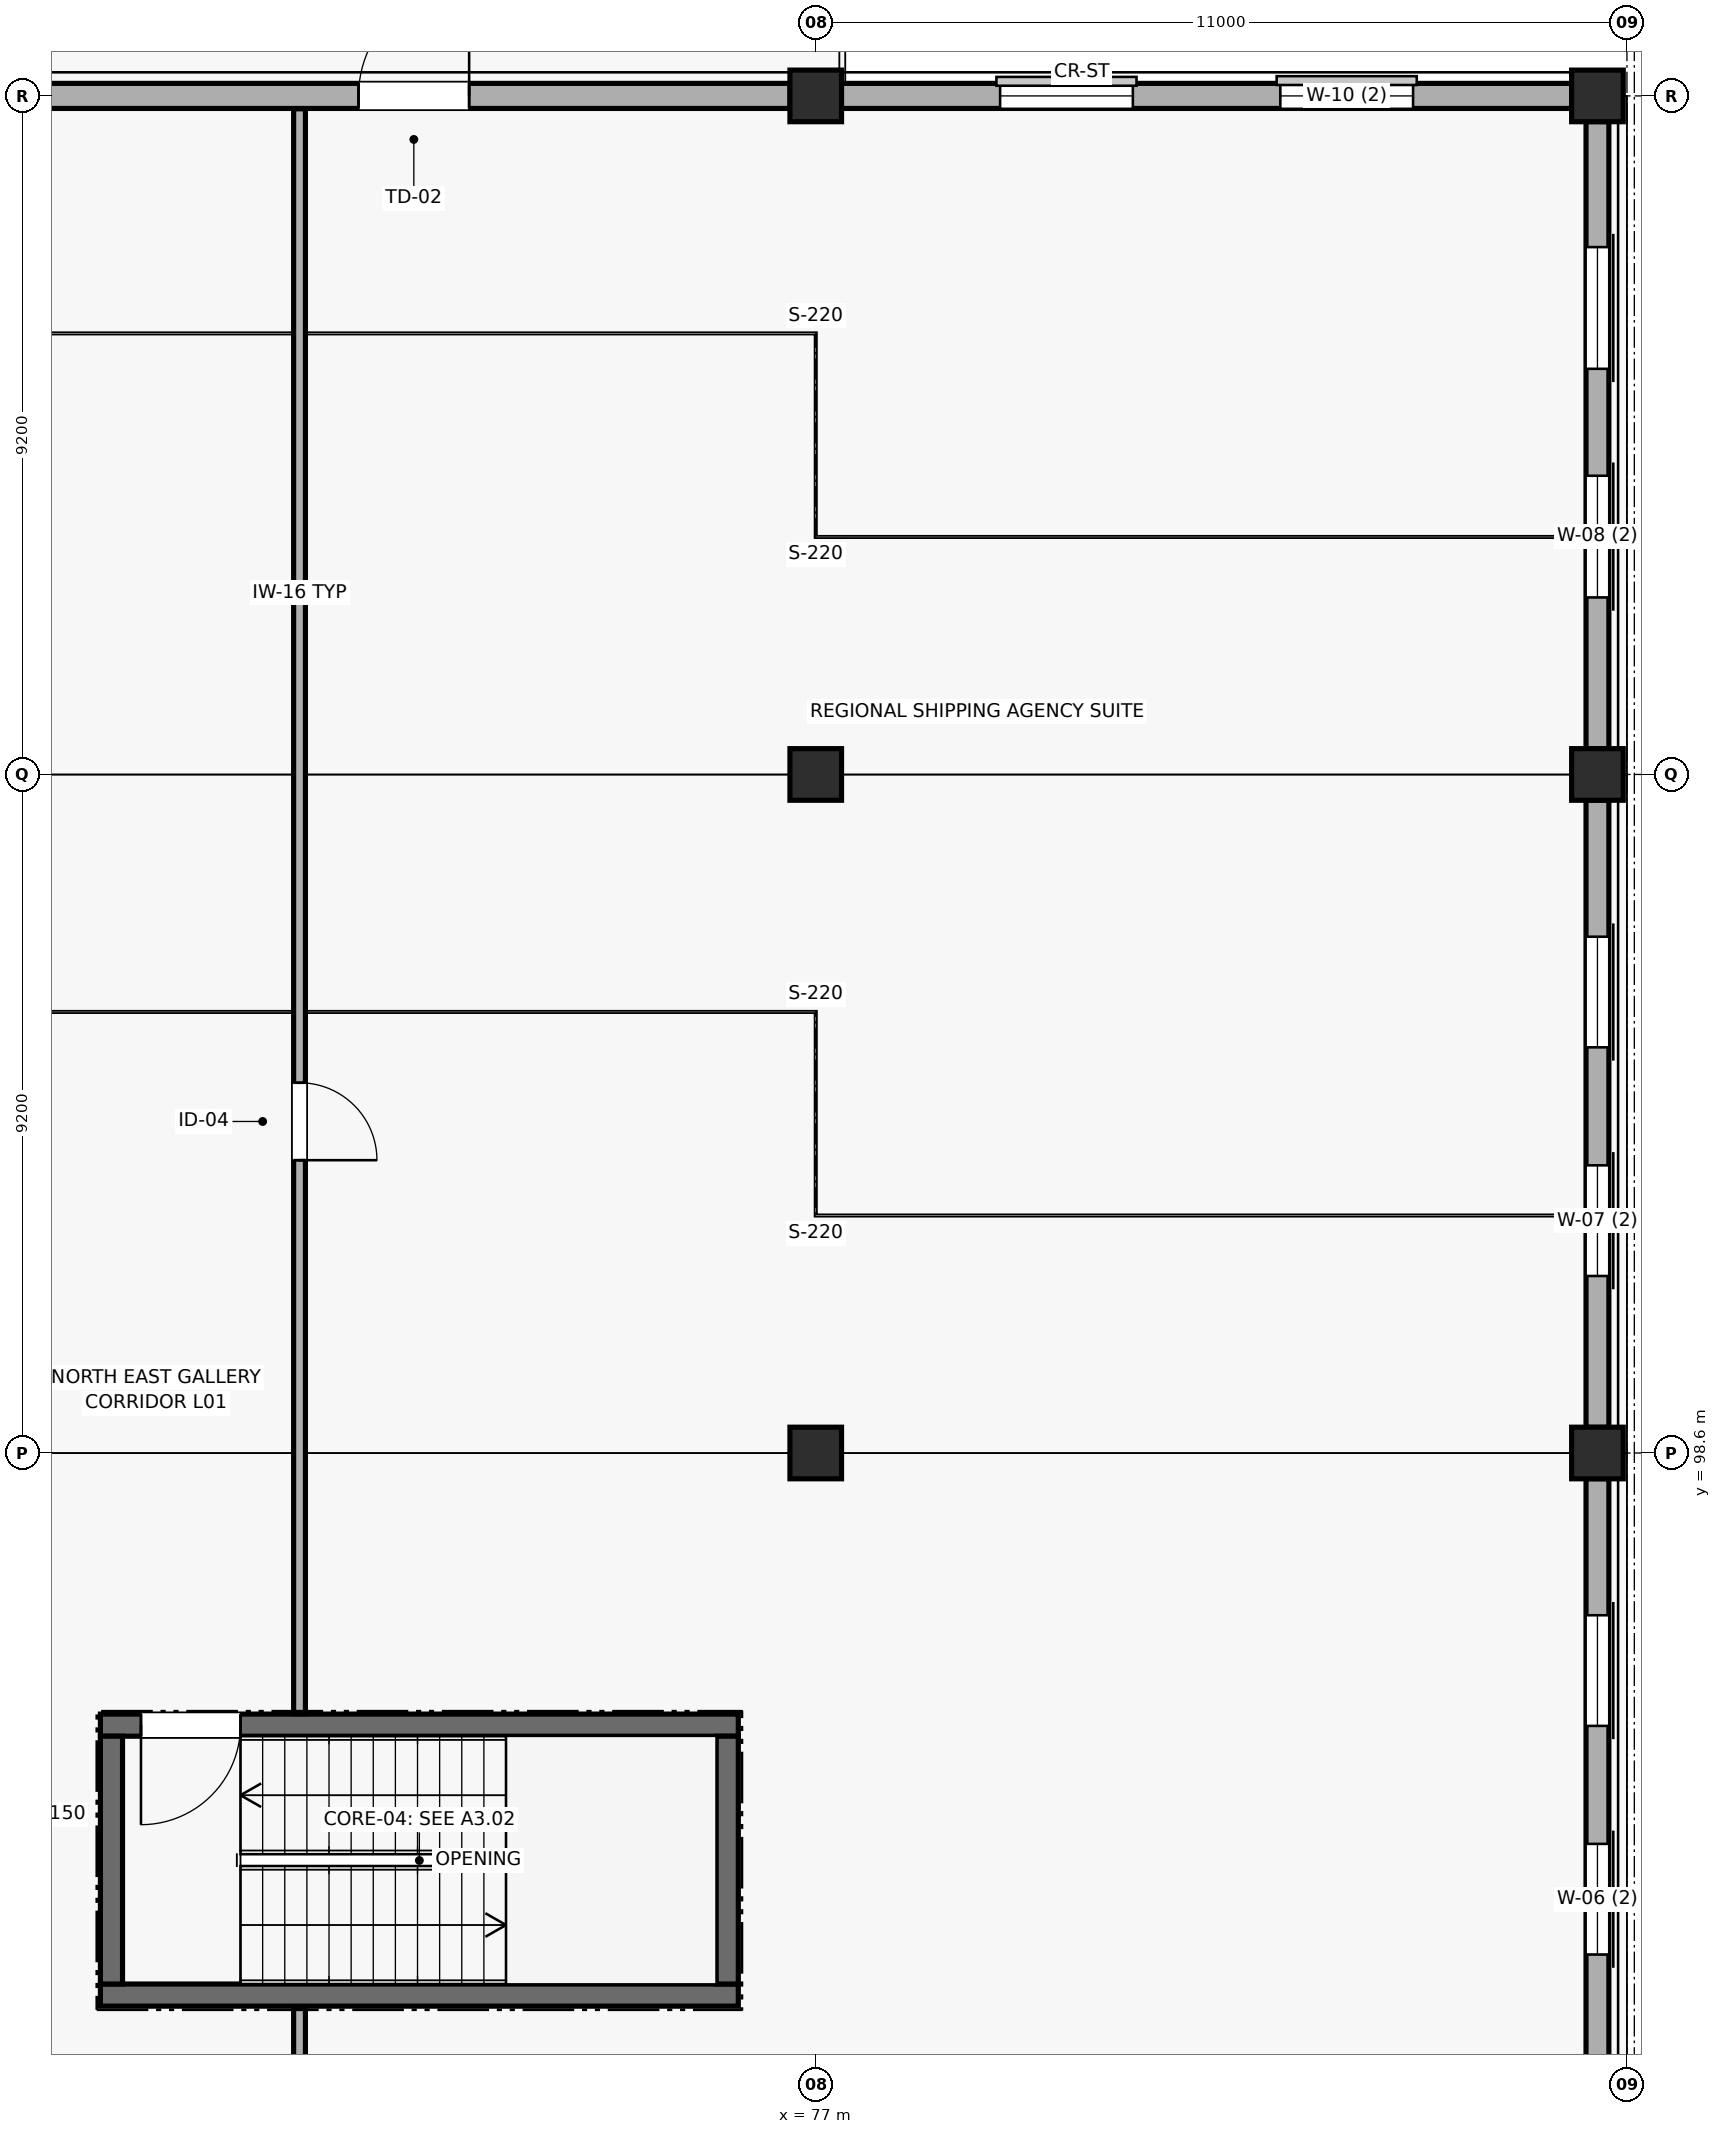
"""IFC4 building model, lengths in metres.
Left out: names, types, materials, properties, quantities, classifications, styles, units other than length and angle.
Written with IfcOpenShell. Run it as: python <this file> out.ifc"""

import sys

from ifc_helpers import new_model, si_unit, direction, frame, frame_2d, origin, origin_2d, place, context, subcontext, project, spatial, rectangle, extrude, element, fill, save


model = new_model("IFC4")
c1 = context("Model", 3, precision=1e-05, world=origin(), true_north=direction((0.0, 1.0)))
c2 = subcontext(c1, "Body", "Model", "MODEL_VIEW")
j1 = project(units=[si_unit("LENGTHUNIT", "METRE"), si_unit("PLANEANGLEUNIT", "RADIAN")], contexts=[c1])
p1 = place(None, origin())
s1 = spatial("IfcSite", under=j1, at=p1, CompositionType="ELEMENT")
p2 = place(p1, origin())
s2 = spatial("IfcBuilding", under=s1, at=p2, CompositionType="ELEMENT")
p3 = place(p2, frame((0.0, 0.0, 5.4)))
s3 = spatial("IfcBuildingStorey", under=s2, at=p3, CompositionType="ELEMENT", Elevation=5.4)
for number, where, z_axis, x_axis in (
    (1, (77.0, 98.6, 0.0), (0.0, 0.0, 1.0), (1.0, 0.0, 0.0)),
    (2, (77.0, 107.8, 0.0), (0.0, 0.0, 1.0), (1.0, 0.0, 0.0)),
    (3, (77.0, 117.0, 0.0), (0.0, 0.0, 1.0), (1.0, 0.0, 0.0)),
    (4, (87.6, 98.6, 0.0), (0.0, 0.0, 1.0), (1.0, 0.0, 0.0)),
    (5, (87.6, 107.8, 0.0), (0.0, 0.0, 1.0), (1.0, 0.0, 0.0)),
    (6, (87.6, 117.0, 0.0), (0.0, 0.0, 1.0), (1.0, 0.0, 0.0)),
):
    element("IfcColumn", number, at=place(p3, frame(where, z_axis=z_axis, x_axis=x_axis)), inside=s3, PredefinedType="COLUMN", context=c2, shape_type="SweptSolid", body=[
        extrude(rectangle(XDim=0.7, YDim=0.7, at=origin_2d()), origin(), (0.0, 0.0, 1.0), 4.5),
    ])
p4 = place(p3, frame((76.652, 117.0, 0.0), z_axis=(0.0, 0.0, 1.0), x_axis=(-1.0, 0.0, 0.0)))
e7 = element("IfcWall", 7, at=p4, inside=s3, PredefinedType="SOLIDWALL", context=c2, shape_type="SweptSolid", body=[
    extrude(rectangle(XDim=10.304, YDim=0.34, at=frame_2d((5.152, 0.0))), origin(), (0.0, 0.0, 1.0), 3.625),
])
p5 = place(p4, frame((4.352, 0.0, 0.0)))
e8 = element("IfcOpeningElement", 8, at=p5, cuts=e7, PredefinedType="OPENING", context=c2, shape_type="SweptSolid", body=[
    extrude(rectangle(XDim=1.5, YDim=2.25, at=frame_2d((0.75, 1.125))), frame((0.0, 0.18, 0.0), z_axis=(0.0, -1.0, 0.0), x_axis=(1.0, 0.0, 0.0)), (0.0, 0.0, 1.0), 0.36),
])
p6 = place(p3, frame((87.252, 117.0, 0.0), z_axis=(0.0, 0.0, 1.0), x_axis=(-1.0, 0.0, 0.0)))
e9 = element("IfcWall", 9, at=p6, inside=s3, PredefinedType="SOLIDWALL", context=c2, shape_type="SweptSolid", body=[
    extrude(rectangle(XDim=9.904, YDim=0.34, at=frame_2d((4.952, 0.0))), origin(), (0.0, 0.0, 1.0), 3.635),
])
p7 = place(p6, frame((2.152, 0.0, 0.95)))
e10 = element("IfcOpeningElement", 10, at=p7, cuts=e9, PredefinedType="OPENING", context=c2, shape_type="SweptSolid", body=[
    extrude(rectangle(XDim=1.8, YDim=2.4, at=frame_2d((0.9, 1.2))), frame((0.0, 0.18, 0.0), z_axis=(0.0, -1.0, 0.0), x_axis=(1.0, 0.0, 0.0)), (0.0, 0.0, 1.0), 0.36),
])
p8 = place(p6, frame((5.952, 0.0, 0.95)))
e11 = element("IfcOpeningElement", 11, at=p8, cuts=e9, PredefinedType="OPENING", context=c2, shape_type="SweptSolid", body=[
    extrude(rectangle(XDim=1.8, YDim=2.4, at=frame_2d((0.9, 1.2))), frame((0.0, 0.18, 0.0), z_axis=(0.0, -1.0, 0.0), x_axis=(1.0, 0.0, 0.0)), (0.0, 0.0, 1.0), 0.36),
])
p9 = place(p3, frame((87.6, 89.748, 0.0), z_axis=(0.0, 0.0, 1.0), x_axis=(0.0, 1.0, 0.0)))
e12 = element("IfcWall", 12, at=p9, inside=s3, PredefinedType="SOLIDWALL", context=c2, shape_type="SweptSolid", body=[
    extrude(rectangle(XDim=8.504, YDim=0.31, at=frame_2d((4.252, 0.0))), origin(), (0.0, 0.0, 1.0), 3.735),
])
p10 = place(p9, frame((2.052, 0.0, 0.95)))
e13 = element("IfcOpeningElement", 13, at=p10, cuts=e12, PredefinedType="OPENING", context=c2, shape_type="SweptSolid", body=[
    extrude(rectangle(XDim=1.5, YDim=1.8, at=frame_2d((0.75, 0.9))), frame((0.0, 0.165, 0.0), z_axis=(0.0, -1.0, 0.0), x_axis=(1.0, 0.0, 0.0)), (0.0, 0.0, 1.0), 0.33),
])
p11 = place(p9, frame((5.152, 0.0, 0.95)))
e14 = element("IfcOpeningElement", 14, at=p11, cuts=e12, PredefinedType="OPENING", context=c2, shape_type="SweptSolid", body=[
    extrude(rectangle(XDim=1.5, YDim=1.8, at=frame_2d((0.75, 0.9))), frame((0.0, 0.165, 0.0), z_axis=(0.0, -1.0, 0.0), x_axis=(1.0, 0.0, 0.0)), (0.0, 0.0, 1.0), 0.33),
])
p12 = place(p3, frame((87.6, 98.948, 0.0), z_axis=(0.0, 0.0, 1.0), x_axis=(0.0, 1.0, 0.0)))
e15 = element("IfcWall", 15, at=p12, inside=s3, PredefinedType="SOLIDWALL", context=c2, shape_type="SweptSolid", body=[
    extrude(rectangle(XDim=8.504, YDim=0.31, at=frame_2d((4.252, 0.0))), origin(), (0.0, 0.0, 1.0), 3.735),
])
p13 = place(p12, frame((2.052, 0.0, 0.95)))
e16 = element("IfcOpeningElement", 16, at=p13, cuts=e15, PredefinedType="OPENING", context=c2, shape_type="SweptSolid", body=[
    extrude(rectangle(XDim=1.5, YDim=2.25, at=frame_2d((0.75, 1.125))), frame((0.0, 0.165, 0.0), z_axis=(0.0, -1.0, 0.0), x_axis=(1.0, 0.0, 0.0)), (0.0, 0.0, 1.0), 0.33),
])
p14 = place(p12, frame((5.152, 0.0, 0.95)))
e17 = element("IfcOpeningElement", 17, at=p14, cuts=e15, PredefinedType="OPENING", context=c2, shape_type="SweptSolid", body=[
    extrude(rectangle(XDim=1.5, YDim=2.25, at=frame_2d((0.75, 1.125))), frame((0.0, 0.165, 0.0), z_axis=(0.0, -1.0, 0.0), x_axis=(1.0, 0.0, 0.0)), (0.0, 0.0, 1.0), 0.33),
])
p15 = place(p3, frame((87.6, 108.148, 0.0), z_axis=(0.0, 0.0, 1.0), x_axis=(0.0, 1.0, 0.0)))
e18 = element("IfcWall", 18, at=p15, inside=s3, PredefinedType="SOLIDWALL", context=c2, shape_type="SweptSolid", body=[
    extrude(rectangle(XDim=8.504, YDim=0.31, at=frame_2d((4.252, 0.0))), origin(), (0.0, 0.0, 1.0), 3.735),
])
p16 = place(p15, frame((2.052, 0.0, 0.95)))
e19 = element("IfcOpeningElement", 19, at=p16, cuts=e18, PredefinedType="OPENING", context=c2, shape_type="SweptSolid", body=[
    extrude(rectangle(XDim=1.65, YDim=2.25, at=frame_2d((0.825, 1.125))), frame((0.0, 0.165, 0.0), z_axis=(0.0, -1.0, 0.0), x_axis=(1.0, 0.0, 0.0)), (0.0, 0.0, 1.0), 0.33),
])
p17 = place(p15, frame((5.152, 0.0, 0.95)))
e20 = element("IfcOpeningElement", 20, at=p17, cuts=e18, PredefinedType="OPENING", context=c2, shape_type="SweptSolid", body=[
    extrude(rectangle(XDim=1.65, YDim=2.25, at=frame_2d((0.825, 1.125))), frame((0.0, 0.165, 0.0), z_axis=(0.0, -1.0, 0.0), x_axis=(1.0, 0.0, 0.0)), (0.0, 0.0, 1.0), 0.33),
])
p18 = place(p3, frame((67.3, 91.25, 0.0), z_axis=(0.0, 0.0, 1.0), x_axis=(1.0, 0.0, 0.0)))
e21 = element("IfcWall", 21, at=p18, inside=s3, PredefinedType="SHEAR", context=c2, shape_type="SweptSolid", body=[
    extrude(rectangle(XDim=8.65, YDim=0.3, at=frame_2d((4.325, 0.0))), origin(), (0.0, 0.0, 1.0), 4.28),
])
p19 = place(p3, frame((75.95, 94.91, 0.0), z_axis=(0.0, 0.0, 1.0), x_axis=(-1.0, 0.0, 0.0)))
e22 = element("IfcWall", 22, at=p19, inside=s3, PredefinedType="SHEAR", context=c2, shape_type="SweptSolid", body=[
    extrude(rectangle(XDim=8.65, YDim=0.3, at=frame_2d((4.325, 0.0))), origin(), (0.0, 0.0, 1.0), 4.28),
])
p20 = place(p19, frame((6.75, 0.0, 0.0)))
e23 = element("IfcOpeningElement", 23, at=p20, cuts=e22, PredefinedType="OPENING", context=c2, shape_type="SweptSolid", body=[
    extrude(rectangle(XDim=1.35, YDim=2.2, at=frame_2d((0.675, 1.1))), frame((0.0, 0.16, 0.0), z_axis=(0.0, -1.0, 0.0), x_axis=(1.0, 0.0, 0.0)), (0.0, 0.0, 1.0), 0.32),
])
for number, where, z_axis, x_axis in (
    (24, (67.45, 94.76, 0.0), (0.0, 0.0, 1.0), (0.0, -1.0, 0.0)),
    (25, (75.8, 91.4, 0.0), (0.0, 0.0, 1.0), (0.0, 1.0, 0.0)),
):
    element("IfcWall", number, at=place(p3, frame(where, z_axis=z_axis, x_axis=x_axis)), inside=s3, PredefinedType="SHEAR", context=c2, shape_type="SweptSolid", body=[
        extrude(rectangle(XDim=3.36, YDim=0.3, at=frame_2d((1.68, 0.0))), origin(), (0.0, 0.0, 1.0), 4.28),
    ])
p21 = place(p3, frame((70.0, 95.065, 0.0), z_axis=(0.0, 0.0, 1.0), x_axis=(0.0, 1.0, 0.0)))
e26 = element("IfcWall", 26, at=p21, inside=s3, PredefinedType="PARTITIONING", context=c2, shape_type="SweptSolid", body=[
    extrude(rectangle(XDim=21.76, YDim=0.16, at=frame_2d((10.88, 0.0))), origin(), (0.0, 0.0, 1.0), 3.625),
])
p22 = place(p21, frame((7.505, 0.0, 0.0)))
e27 = element("IfcOpeningElement", 27, at=p22, cuts=e26, PredefinedType="OPENING", context=c2, shape_type="SweptSolid", body=[
    extrude(rectangle(XDim=1.05, YDim=2.2, at=frame_2d((0.525, 1.1))), frame((0.0, 0.09, 0.0), z_axis=(0.0, -1.0, 0.0), x_axis=(1.0, 0.0, 0.0)), (0.0, 0.0, 1.0), 0.18),
])
p23 = place(p3, frame((70.0, 71.76, 0.0), z_axis=(0.0, 0.0, 1.0), x_axis=(0.0, 1.0, 0.0)))
e28 = element("IfcWall", 28, at=p23, inside=s3, PredefinedType="PARTITIONING", context=c2, shape_type="SweptSolid", body=[
    extrude(rectangle(XDim=19.335, YDim=0.16, at=frame_2d((9.667, 0.0))), origin(), (0.0, 0.0, 1.0), 3.625),
])
p24 = place(p23, frame((7.54, 0.0, 0.0)))
e29 = element("IfcOpeningElement", 29, at=p24, cuts=e28, PredefinedType="OPENING", context=c2, shape_type="SweptSolid", body=[
    extrude(rectangle(XDim=1.7, YDim=2.35, at=frame_2d((0.85, 1.175))), frame((0.0, 0.09, 0.0), z_axis=(0.0, -1.0, 0.0), x_axis=(1.0, 0.0, 0.0)), (0.0, 0.0, 1.0), 0.18),
])
p25 = place(p5, frame((1.5, 0.0, 0.0), z_axis=(0.0, 0.0, 1.0), x_axis=(-1.0, 0.0, 0.0)))
e30 = element("IfcDoor", 30, at=p25, inside=s3, OperationType="SINGLE_SWING_RIGHT", PredefinedType="DOOR", context=c2, shape_type="SweptSolid", body=[
    extrude(rectangle(XDim=1.5, YDim=2.25, at=frame_2d((0.75, 1.125))), frame((0.0, 0.025, 0.0), z_axis=(0.0, -1.0, 0.0), x_axis=(1.0, 0.0, 0.0)), (0.0, 0.0, 1.0), 0.05),
])
fill(e8, e30)
p26 = place(p7, origin())
e31 = element("IfcWindow", 31, at=p26, inside=s3, PartitioningType="SINGLE_PANEL", PredefinedType="WINDOW", context=c2, shape_type="SweptSolid", body=[
    extrude(rectangle(XDim=1.8, YDim=2.4, at=frame_2d((0.9, 1.2))), frame((0.0, 0.03, 0.0), z_axis=(0.0, -1.0, 0.0), x_axis=(1.0, 0.0, 0.0)), (0.0, 0.0, 1.0), 0.06),
])
fill(e10, e31)
p27 = place(p8, origin())
e32 = element("IfcWindow", 32, at=p27, inside=s3, PartitioningType="SINGLE_PANEL", PredefinedType="WINDOW", context=c2, shape_type="SweptSolid", body=[
    extrude(rectangle(XDim=1.8, YDim=2.4, at=frame_2d((0.9, 1.2))), frame((0.0, 0.03, 0.0), z_axis=(0.0, -1.0, 0.0), x_axis=(1.0, 0.0, 0.0)), (0.0, 0.0, 1.0), 0.06),
])
fill(e11, e32)
p28 = place(p10, origin())
e33 = element("IfcWindow", 33, at=p28, inside=s3, PartitioningType="SINGLE_PANEL", PredefinedType="WINDOW", context=c2, shape_type="SweptSolid", body=[
    extrude(rectangle(XDim=1.5, YDim=1.8, at=frame_2d((0.75, 0.9))), frame((0.0, 0.03, 0.0), z_axis=(0.0, -1.0, 0.0), x_axis=(1.0, 0.0, 0.0)), (0.0, 0.0, 1.0), 0.06),
])
fill(e13, e33)
p29 = place(p11, origin())
e34 = element("IfcWindow", 34, at=p29, inside=s3, PartitioningType="SINGLE_PANEL", PredefinedType="WINDOW", context=c2, shape_type="SweptSolid", body=[
    extrude(rectangle(XDim=1.5, YDim=1.8, at=frame_2d((0.75, 0.9))), frame((0.0, 0.03, 0.0), z_axis=(0.0, -1.0, 0.0), x_axis=(1.0, 0.0, 0.0)), (0.0, 0.0, 1.0), 0.06),
])
fill(e14, e34)
p30 = place(p13, origin())
e35 = element("IfcWindow", 35, at=p30, inside=s3, PartitioningType="SINGLE_PANEL", PredefinedType="WINDOW", context=c2, shape_type="SweptSolid", body=[
    extrude(rectangle(XDim=1.5, YDim=2.25, at=frame_2d((0.75, 1.125))), frame((0.0, 0.03, 0.0), z_axis=(0.0, -1.0, 0.0), x_axis=(1.0, 0.0, 0.0)), (0.0, 0.0, 1.0), 0.06),
])
fill(e16, e35)
p31 = place(p14, origin())
e36 = element("IfcWindow", 36, at=p31, inside=s3, PartitioningType="SINGLE_PANEL", PredefinedType="WINDOW", context=c2, shape_type="SweptSolid", body=[
    extrude(rectangle(XDim=1.5, YDim=2.25, at=frame_2d((0.75, 1.125))), frame((0.0, 0.03, 0.0), z_axis=(0.0, -1.0, 0.0), x_axis=(1.0, 0.0, 0.0)), (0.0, 0.0, 1.0), 0.06),
])
fill(e17, e36)
p32 = place(p16, origin())
e37 = element("IfcWindow", 37, at=p32, inside=s3, PartitioningType="SINGLE_PANEL", PredefinedType="WINDOW", context=c2, shape_type="SweptSolid", body=[
    extrude(rectangle(XDim=1.65, YDim=2.25, at=frame_2d((0.825, 1.125))), frame((0.0, 0.03, 0.0), z_axis=(0.0, -1.0, 0.0), x_axis=(1.0, 0.0, 0.0)), (0.0, 0.0, 1.0), 0.06),
])
fill(e19, e37)
p33 = place(p17, origin())
e38 = element("IfcWindow", 38, at=p33, inside=s3, PartitioningType="SINGLE_PANEL", PredefinedType="WINDOW", context=c2, shape_type="SweptSolid", body=[
    extrude(rectangle(XDim=1.65, YDim=2.25, at=frame_2d((0.825, 1.125))), frame((0.0, 0.03, 0.0), z_axis=(0.0, -1.0, 0.0), x_axis=(1.0, 0.0, 0.0)), (0.0, 0.0, 1.0), 0.06),
])
fill(e20, e38)
p34 = place(p20, origin())
e39 = element("IfcDoor", 39, at=p34, inside=s3, OperationType="SINGLE_SWING_RIGHT", PredefinedType="DOOR", context=c2, shape_type="SweptSolid", body=[
    extrude(rectangle(XDim=1.35, YDim=2.2, at=frame_2d((0.675, 1.1))), frame((0.0, 0.025, 0.0), z_axis=(0.0, -1.0, 0.0), x_axis=(1.0, 0.0, 0.0)), (0.0, 0.0, 1.0), 0.05),
])
fill(e23, e39)
p35 = place(p22, frame((1.05, 0.0, 0.0), z_axis=(0.0, 0.0, 1.0), x_axis=(-1.0, 0.0, 0.0)))
e40 = element("IfcDoor", 40, at=p35, inside=s3, OperationType="SINGLE_SWING_RIGHT", PredefinedType="DOOR", context=c2, shape_type="SweptSolid", body=[
    extrude(rectangle(XDim=1.05, YDim=2.2, at=frame_2d((0.525, 1.1))), frame((0.0, 0.025, 0.0), z_axis=(0.0, -1.0, 0.0), x_axis=(1.0, 0.0, 0.0)), (0.0, 0.0, 1.0), 0.05),
])
fill(e27, e40)
save(model, sys.argv[1])
